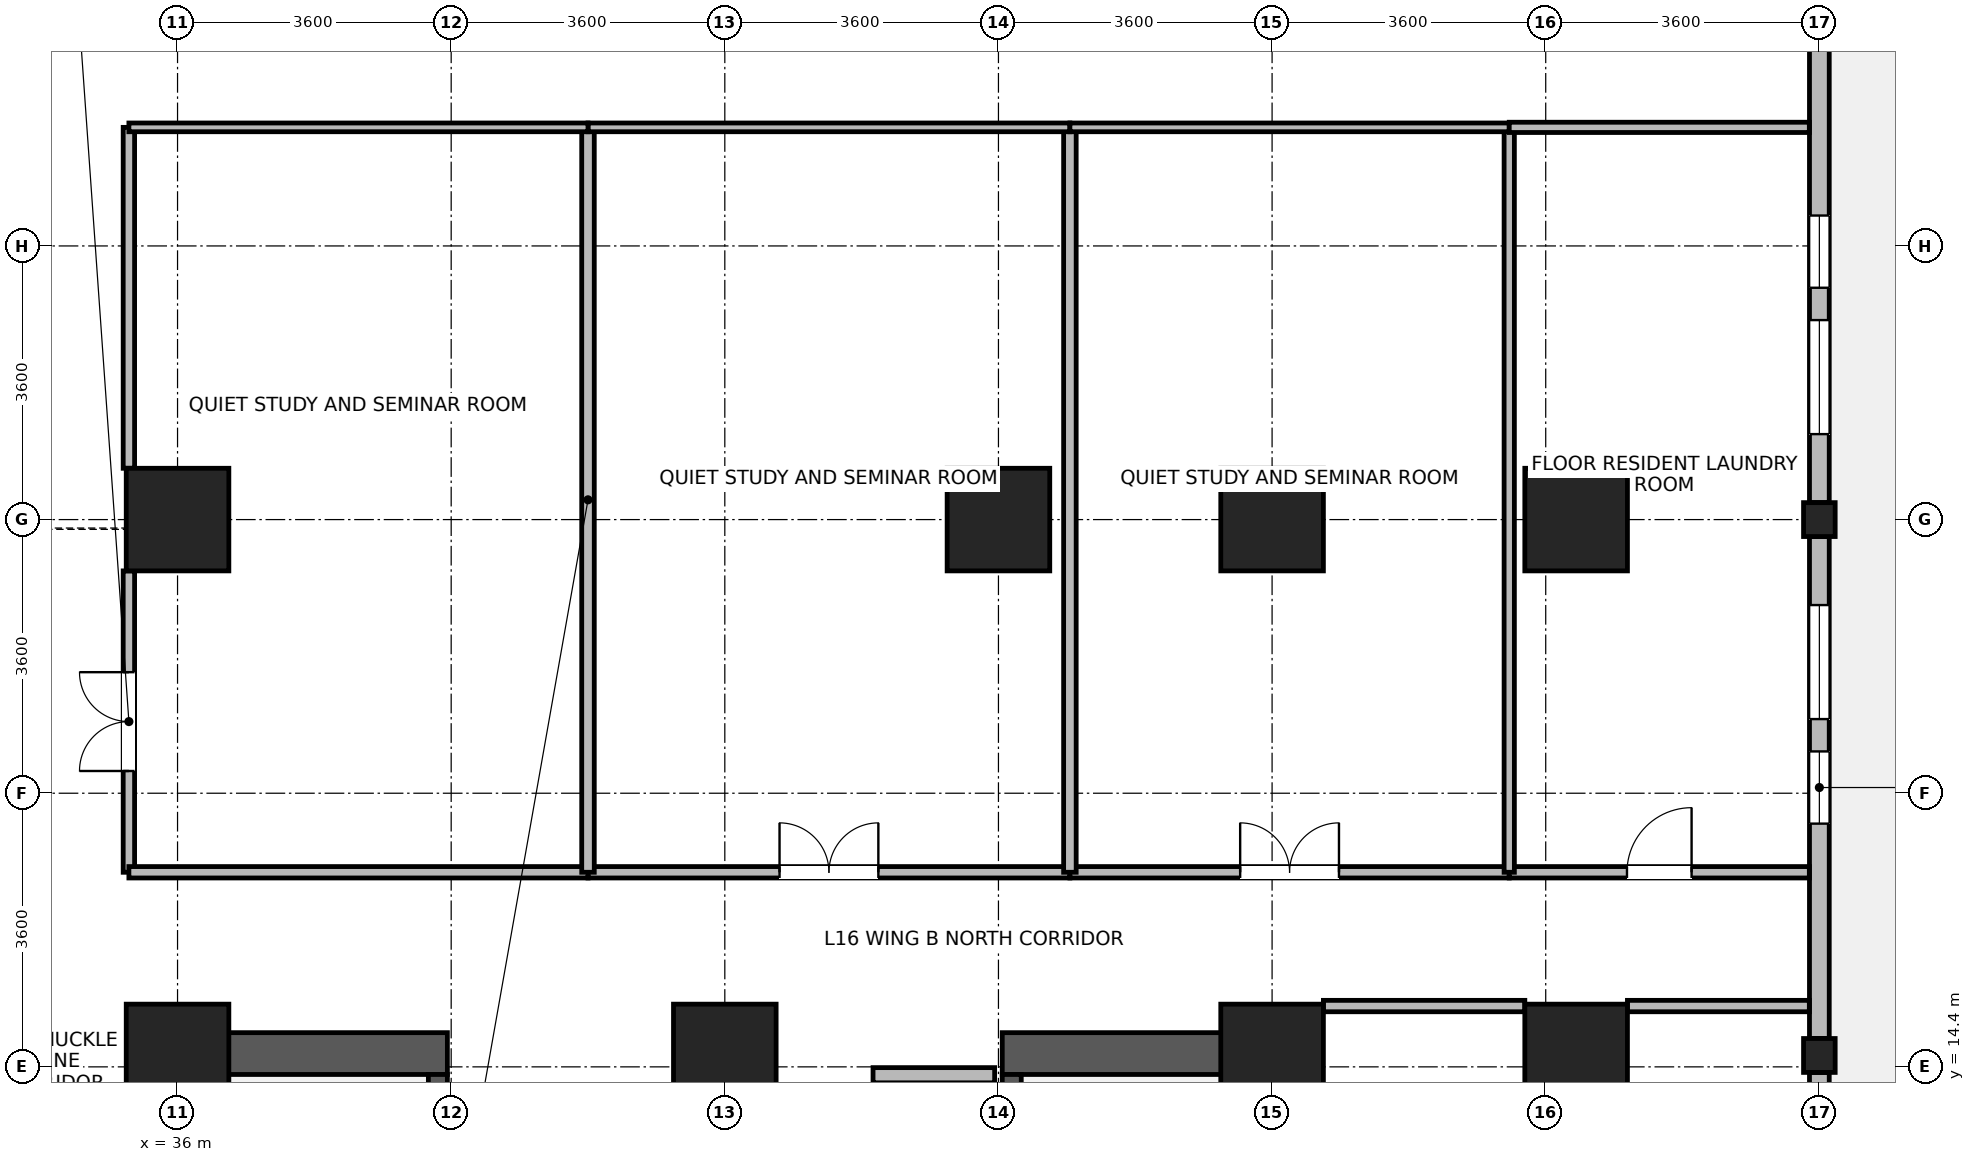
"""IFC4 building model, lengths in metres.
Left out: names, types, materials, properties, quantities, classifications, styles, units other than length and angle.
Written with IfcOpenShell. Run it as: python <this file> out.ifc"""

import sys

from ifc_helpers import new_model, si_unit, direction, frame, frame_2d, origin, origin_2d, place, context, subcontext, project, spatial, rectangle, i_section, extrude, source, transform, mapped, element, fill, save


model = new_model("IFC4")
c1 = context("Model", 3, precision=1e-05, world=origin(), true_north=direction((0.0, 1.0)))
c2 = subcontext(c1, "Body", "Model", "MODEL_VIEW")
j1 = project(units=[si_unit("LENGTHUNIT", "METRE"), si_unit("PLANEANGLEUNIT", "RADIAN")], contexts=[c1])
p1 = place(None, origin())
s1 = spatial("IfcSite", under=j1, at=p1, CompositionType="ELEMENT")
p2 = place(p1, origin())
s2 = spatial("IfcBuilding", under=s1, at=p2, CompositionType="ELEMENT")
p3 = place(p2, frame((0.0, 0.0, 66.0)))
s3 = spatial("IfcBuildingStorey", under=s2, at=p3, CompositionType="ELEMENT", Elevation=66.0)
for number, where, z_axis, x_axis in (
    (1, (36.075, 6.75, 0.0), (0.0, 0.0, 1.0), (0.0, 1.0, 0.0)),
    (2, (50.325, 6.75, 0.0), (0.0, 0.0, 1.0), (0.0, 1.0, 0.0)),
):
    element("IfcWall", number, at=place(p3, frame(where, z_axis=z_axis, x_axis=x_axis)), inside=s3, PredefinedType="SHEAR", context=c2, shape_type="SweptSolid", body=[
        extrude(rectangle(XDim=8.1, YDim=0.55, at=frame_2d((4.05, 0.0))), origin(), (0.0, 0.0, 1.0), 3.45),
    ])
for number, where, z_axis, x_axis in (
    (3, (36.35, 14.575, 0.0), (0.0, 0.0, 1.0), (1.0, 0.0, 0.0)),
    (4, (46.85, 14.575, 0.0), (0.0, 0.0, 1.0), (1.0, 0.0, 0.0)),
):
    element("IfcWall", number, at=place(p3, frame(where, z_axis=z_axis, x_axis=x_axis)), inside=s3, PredefinedType="SHEAR", context=c2, shape_type="SweptSolid", body=[
        extrude(rectangle(XDim=3.2, YDim=0.55, at=frame_2d((1.6, 0.0))), origin(), (0.0, 0.0, 1.0), 3.45),
    ])
p4 = place(p3, frame((39.425, 7.3, 0.0), z_axis=(0.0, 0.0, 1.0), x_axis=(0.0, 1.0, 0.0)))
e5 = element("IfcWall", 5, at=p4, inside=s3, PredefinedType="SHEAR", context=c2, shape_type="SweptSolid", body=[
    extrude(rectangle(XDim=7.0, YDim=0.25, at=frame_2d((3.5, 0.0))), origin(), (0.0, 0.0, 1.0), 3.45),
])
p5 = place(p4, frame((0.15, 0.0, 0.0)))
e6 = element("IfcOpeningElement", 6, at=p5, cuts=e5, PredefinedType="OPENING", context=c2, shape_type="SweptSolid", body=[
    extrude(rectangle(XDim=1.1, YDim=2.08, at=frame_2d((0.55, 1.04))), frame((0.0, 0.135, 0.0), z_axis=(0.0, -1.0, 0.0), x_axis=(1.0, 0.0, 0.0)), (0.0, 0.0, 1.0), 0.27),
])
p6 = place(p3, frame((46.975, 7.3, 0.0), z_axis=(0.0, 0.0, 1.0), x_axis=(0.0, 1.0, 0.0)))
e7 = element("IfcWall", 7, at=p6, inside=s3, PredefinedType="SHEAR", context=c2, shape_type="SweptSolid", body=[
    extrude(rectangle(XDim=7.0, YDim=0.25, at=frame_2d((3.5, 0.0))), origin(), (0.0, 0.0, 1.0), 3.45),
])
p7 = place(p6, frame((0.15, 0.0, 0.0)))
e8 = element("IfcOpeningElement", 8, at=p7, cuts=e7, PredefinedType="OPENING", context=c2, shape_type="SweptSolid", body=[
    extrude(rectangle(XDim=1.1, YDim=2.08, at=frame_2d((0.55, 1.04))), frame((0.0, 0.135, 0.0), z_axis=(0.0, -1.0, 0.0), x_axis=(1.0, 0.0, 0.0)), (0.0, 0.0, 1.0), 0.27),
])
m1 = source(origin(), c2, "Body", "SweptSolid", [
    extrude(rectangle(XDim=1.35, YDim=1.35, at=origin_2d()), origin(), (0.0, 0.0, 1.0), 3.7),
])
for number, where, z_axis, x_axis in (
    (9, (36.0, 21.6, 0.0), (0.0, 0.0, 1.0), (1.0, 0.0, 0.0)),
    (10, (46.8, 21.6, 0.0), (0.0, 0.0, 1.0), (1.0, 0.0, 0.0)),
    (11, (36.0, 14.55, 0.0), (0.0, 0.0, 1.0), (1.0, 0.0, 0.0)),
    (12, (43.2, 14.55, 0.0), (0.0, 0.0, 1.0), (1.0, 0.0, 0.0)),
    (13, (50.4, 14.55, 0.0), (0.0, 0.0, 1.0), (1.0, 0.0, 0.0)),
    (14, (50.4, 21.6, 0.0), (0.0, 0.0, 1.0), (1.0, 0.0, 0.0)),
    (15, (54.4, 14.55, 0.0), (0.0, 0.0, 1.0), (1.0, 0.0, 0.0)),
    (16, (54.4, 21.6, 0.0), (0.0, 0.0, 1.0), (1.0, 0.0, 0.0)),
):
    element("IfcColumn", number, at=place(p3, frame(where, z_axis=z_axis, x_axis=x_axis)), inside=s3, PredefinedType="COLUMN", context=c2, shape_type="MappedRepresentation", body=[
        mapped(m1, transform((0.0, 0.0, 0.0), x_axis=(1.0, 0.0, 0.0), y_axis=(0.0, 1.0, 0.0), z_axis=(0.0, 0.0, 1.0), scale=1.0)),
    ])
m2 = source(origin(), c2, "Body", "SweptSolid", [
    extrude(i_section(OverallWidth=0.416, OverallDepth=0.446, WebThickness=0.029, FlangeThickness=0.04, FilletRadius=0.015, at=origin_2d()), origin(), (0.0, 0.0, 1.0), 3.7),
])
for number, where, z_axis, x_axis in (
    (17, (57.6, 14.55, 0.0), (0.0, 0.0, 1.0), (1.0, 0.0, 0.0)),
    (18, (57.6, 21.6, 0.0), (0.0, 0.0, 1.0), (1.0, 0.0, 0.0)),
):
    element("IfcColumn", number, at=place(p3, frame(where, z_axis=z_axis, x_axis=x_axis)), inside=s3, PredefinedType="COLUMN", context=c2, shape_type="MappedRepresentation", body=[
        mapped(m2, transform((0.0, 0.0, 0.0), x_axis=(1.0, 0.0, 0.0), y_axis=(0.0, 1.0, 0.0), z_axis=(0.0, 0.0, 1.0), scale=1.0)),
    ])
p8 = place(p3, frame((57.6, 14.326, 0.0), z_axis=(0.0, 0.0, 1.0), x_axis=(0.0, -1.0, 0.0)))
e19 = element("IfcWall", 19, at=p8, inside=s3, PredefinedType="STANDARD", context=c2, shape_type="SweptSolid", body=[
    extrude(rectangle(XDim=7.052, YDim=0.26, at=frame_2d((3.526, 0.0))), origin(), (0.0, 0.0, 1.0), 2.93),
])
p9 = place(p8, frame((2.776, 0.0, 0.0)))
e20 = element("IfcOpeningElement", 20, at=p9, cuts=e19, PredefinedType="OPENING", context=c2, shape_type="SweptSolid", body=[
    extrude(rectangle(XDim=1.5, YDim=2.15, at=frame_2d((0.75, 1.075))), frame((0.0, 0.14, 0.0), z_axis=(0.0, -1.0, 0.0), x_axis=(1.0, 0.0, 0.0)), (0.0, 0.0, 1.0), 0.28),
])
p10 = place(p8, frame((1.013, 0.0, 0.85)))
e21 = element("IfcOpeningElement", 21, at=p10, cuts=e19, PredefinedType="OPENING", context=c2, shape_type="SweptSolid", body=[
    extrude(rectangle(XDim=1.5, YDim=1.85, at=frame_2d((0.75, 0.925))), frame((0.0, 0.14, 0.0), z_axis=(0.0, -1.0, 0.0), x_axis=(1.0, 0.0, 0.0)), (0.0, 0.0, 1.0), 0.28),
])
p11 = place(p8, frame((4.539, 0.0, 0.85)))
e22 = element("IfcOpeningElement", 22, at=p11, cuts=e19, PredefinedType="OPENING", context=c2, shape_type="SweptSolid", body=[
    extrude(rectangle(XDim=1.5, YDim=1.85, at=frame_2d((0.75, 0.925))), frame((0.0, 0.14, 0.0), z_axis=(0.0, -1.0, 0.0), x_axis=(1.0, 0.0, 0.0)), (0.0, 0.0, 1.0), 0.28),
])
p12 = place(p3, frame((57.6, 21.376, 0.0), z_axis=(0.0, 0.0, 1.0), x_axis=(0.0, -1.0, 0.0)))
e23 = element("IfcWall", 23, at=p12, inside=s3, PredefinedType="STANDARD", context=c2, shape_type="SweptSolid", body=[
    extrude(rectangle(XDim=6.602, YDim=0.26, at=frame_2d((3.301, 0.0))), origin(), (0.0, 0.0, 1.0), 2.93),
])
p13 = place(p12, frame((0.9, 0.0, 0.85)))
e24 = element("IfcOpeningElement", 24, at=p13, cuts=e23, PredefinedType="OPENING", context=c2, shape_type="SweptSolid", body=[
    extrude(rectangle(XDim=1.5, YDim=1.85, at=frame_2d((0.75, 0.925))), frame((0.0, 0.14, 0.0), z_axis=(0.0, -1.0, 0.0), x_axis=(1.0, 0.0, 0.0)), (0.0, 0.0, 1.0), 0.28),
])
p14 = place(p12, frame((2.826, 0.0, 0.85)))
e25 = element("IfcOpeningElement", 25, at=p14, cuts=e23, PredefinedType="OPENING", context=c2, shape_type="SweptSolid", body=[
    extrude(rectangle(XDim=0.95, YDim=1.75, at=frame_2d((0.475, 0.875))), frame((0.0, 0.14, 0.0), z_axis=(0.0, -1.0, 0.0), x_axis=(1.0, 0.0, 0.0)), (0.0, 0.0, 1.0), 0.28),
])
p15 = place(p3, frame((57.6, 28.426, 0.0), z_axis=(0.0, 0.0, 1.0), x_axis=(0.0, -1.0, 0.0)))
e26 = element("IfcWall", 26, at=p15, inside=s3, PredefinedType="STANDARD", context=c2, shape_type="SweptSolid", body=[
    extrude(rectangle(XDim=6.602, YDim=0.26, at=frame_2d((3.301, 0.0))), origin(), (0.0, 0.0, 1.0), 2.93),
])
p16 = place(p15, frame((4.201, 0.0, 0.85)))
e27 = element("IfcOpeningElement", 27, at=p16, cuts=e26, PredefinedType="OPENING", context=c2, shape_type="SweptSolid", body=[
    extrude(rectangle(XDim=1.5, YDim=1.85, at=frame_2d((0.75, 0.925))), frame((0.0, 0.14, 0.0), z_axis=(0.0, -1.0, 0.0), x_axis=(1.0, 0.0, 0.0)), (0.0, 0.0, 1.0), 0.28),
])
p17 = place(p15, frame((2.826, 0.0, 0.85)))
e28 = element("IfcOpeningElement", 28, at=p17, cuts=e26, PredefinedType="OPENING", context=c2, shape_type="SweptSolid", body=[
    extrude(rectangle(XDim=0.95, YDim=1.75, at=frame_2d((0.475, 0.875))), frame((0.0, 0.14, 0.0), z_axis=(0.0, -1.0, 0.0), x_axis=(1.0, 0.0, 0.0)), (0.0, 0.0, 1.0), 0.28),
])
p18 = place(p3, frame((45.15, 14.29, 0.0), z_axis=(0.0, 0.0, 1.0), x_axis=(1.0, 0.0, 0.0)))
e29 = element("IfcWall", 29, at=p18, inside=s3, PredefinedType="PARTITIONING", context=c2, shape_type="SweptSolid", body=[
    extrude(rectangle(XDim=1.6, YDim=0.2, at=frame_2d((0.8, 0.0))), origin(), (0.0, 0.0, 1.0), 2.23),
])
p19 = place(p3, frame((35.36, 16.96, 0.0), z_axis=(0.0, 0.0, 1.0), x_axis=(0.0, 1.0, 0.0)))
e30 = element("IfcWall", 30, at=p19, inside=s3, PredefinedType="PARTITIONING", context=c2, shape_type="SweptSolid", body=[
    extrude(rectangle(XDim=3.965, YDim=0.15, at=frame_2d((1.982, 0.0))), origin(), (0.0, 0.0, 1.0), 3.43),
])
p20 = place(p19, frame((1.333, 0.0, 0.0)))
e31 = element("IfcOpeningElement", 31, at=p20, cuts=e30, PredefinedType="OPENING", context=c2, shape_type="SweptSolid", body=[
    extrude(rectangle(XDim=1.3, YDim=2.12, at=frame_2d((0.65, 1.06))), frame((0.0, 0.085, 0.0), z_axis=(0.0, -1.0, 0.0), x_axis=(1.0, 0.0, 0.0)), (0.0, 0.0, 1.0), 0.17),
])
p21 = place(p3, frame((35.36, 22.275, 0.0), z_axis=(0.0, 0.0, 1.0), x_axis=(0.0, 1.0, 0.0)))
e32 = element("IfcWall", 32, at=p21, inside=s3, PredefinedType="PARTITIONING", context=c2, shape_type="SweptSolid", body=[
    extrude(rectangle(XDim=4.485, YDim=0.15, at=frame_2d((2.243, 0.0))), origin(), (0.0, 0.0, 1.0), 3.43),
])
p22 = place(p3, frame((51.075, 15.2, 0.0), z_axis=(0.0, 0.0, 1.0), x_axis=(1.0, 0.0, 0.0)))
e33 = element("IfcWall", 33, at=p22, inside=s3, PredefinedType="PARTITIONING", context=c2, shape_type="SweptSolid", body=[
    extrude(rectangle(XDim=2.65, YDim=0.15, at=frame_2d((1.325, 0.0))), origin(), (0.0, 0.0, 1.0), 3.43),
])
p23 = place(p3, frame((55.075, 15.2, 0.0), z_axis=(0.0, 0.0, 1.0), x_axis=(1.0, 0.0, 0.0)))
e34 = element("IfcWall", 34, at=p23, inside=s3, PredefinedType="PARTITIONING", context=c2, shape_type="SweptSolid", body=[
    extrude(rectangle(XDim=2.393, YDim=0.15, at=frame_2d((1.197, 0.0))), origin(), (0.0, 0.0, 1.0), 3.43),
])
p24 = place(p3, frame((41.4, 16.96, 0.0), z_axis=(0.0, 0.0, 1.0), x_axis=(1.0, 0.0, 0.0)))
e35 = element("IfcWall", 35, at=p24, inside=s3, PredefinedType="PARTITIONING", context=c2, shape_type="SweptSolid", body=[
    extrude(rectangle(XDim=6.34, YDim=0.15, at=frame_2d((3.17, 0.0))), origin(), (0.0, 0.0, 1.0), 3.43),
])
p25 = place(p24, frame((2.52, 0.0, 0.0)))
e36 = element("IfcOpeningElement", 36, at=p25, cuts=e35, PredefinedType="OPENING", context=c2, shape_type="SweptSolid", body=[
    extrude(rectangle(XDim=1.3, YDim=2.12, at=frame_2d((0.65, 1.06))), frame((0.0, 0.085, 0.0), z_axis=(0.0, -1.0, 0.0), x_axis=(1.0, 0.0, 0.0)), (0.0, 0.0, 1.0), 0.17),
])
p26 = place(p3, frame((35.36, 16.96, 0.0), z_axis=(0.0, 0.0, 1.0), x_axis=(1.0, 0.0, 0.0)))
e37 = element("IfcWall", 37, at=p26, inside=s3, PredefinedType="PARTITIONING", context=c2, shape_type="SweptSolid", body=[
    extrude(rectangle(XDim=6.04, YDim=0.15, at=frame_2d((3.02, 0.0))), origin(), (0.0, 0.0, 1.0), 3.43),
])
p27 = place(p3, frame((47.74, 16.96, 0.0), z_axis=(0.0, 0.0, 1.0), x_axis=(1.0, 0.0, 0.0)))
e38 = element("IfcWall", 38, at=p27, inside=s3, PredefinedType="PARTITIONING", context=c2, shape_type="SweptSolid", body=[
    extrude(rectangle(XDim=5.78, YDim=0.15, at=frame_2d((2.89, 0.0))), origin(), (0.0, 0.0, 1.0), 3.43),
])
p28 = place(p27, frame((2.24, 0.0, 0.0)))
e39 = element("IfcOpeningElement", 39, at=p28, cuts=e38, PredefinedType="OPENING", context=c2, shape_type="SweptSolid", body=[
    extrude(rectangle(XDim=1.3, YDim=2.12, at=frame_2d((0.65, 1.06))), frame((0.0, 0.085, 0.0), z_axis=(0.0, -1.0, 0.0), x_axis=(1.0, 0.0, 0.0)), (0.0, 0.0, 1.0), 0.17),
])
p29 = place(p3, frame((53.52, 16.96, 0.0), z_axis=(0.0, 0.0, 1.0), x_axis=(1.0, 0.0, 0.0)))
e40 = element("IfcWall", 40, at=p29, inside=s3, PredefinedType="PARTITIONING", context=c2, shape_type="SweptSolid", body=[
    extrude(rectangle(XDim=3.948, YDim=0.15, at=frame_2d((1.974, 0.0))), origin(), (0.0, 0.0, 1.0), 3.43),
])
p30 = place(p29, frame((1.549, 0.0, 0.0)))
e41 = element("IfcOpeningElement", 41, at=p30, cuts=e40, PredefinedType="OPENING", context=c2, shape_type="SweptSolid", body=[
    extrude(rectangle(XDim=0.85, YDim=2.04, at=frame_2d((0.425, 1.02))), frame((0.0, 0.085, 0.0), z_axis=(0.0, -1.0, 0.0), x_axis=(1.0, 0.0, 0.0)), (0.0, 0.0, 1.0), 0.17),
])
for number, where, z_axis, x_axis in (
    (42, (41.4, 16.96, 0.0), (0.0, 0.0, 1.0), (0.0, 1.0, 0.0)),
    (43, (47.74, 16.96, 0.0), (0.0, 0.0, 1.0), (0.0, 1.0, 0.0)),
):
    element("IfcWall", number, at=place(p3, frame(where, z_axis=z_axis, x_axis=x_axis)), inside=s3, PredefinedType="PARTITIONING", context=c2, shape_type="SweptSolid", body=[
        extrude(rectangle(XDim=9.8, YDim=0.165, at=frame_2d((4.9, 0.0))), origin(), (0.0, 0.0, 1.0), 3.43),
    ])
p31 = place(p3, frame((53.52, 16.96, 0.0), z_axis=(0.0, 0.0, 1.0), x_axis=(0.0, 1.0, 0.0)))
e44 = element("IfcWall", 44, at=p31, inside=s3, PredefinedType="PARTITIONING", context=c2, shape_type="SweptSolid", body=[
    extrude(rectangle(XDim=9.8, YDim=0.135, at=frame_2d((4.9, 0.0))), origin(), (0.0, 0.0, 1.0), 3.43),
])
p32 = place(p3, frame((41.4, 26.76, 0.0), z_axis=(0.0, 0.0, 1.0), x_axis=(1.0, 0.0, 0.0)))
e45 = element("IfcWall", 45, at=p32, inside=s3, PredefinedType="PARTITIONING", context=c2, shape_type="SweptSolid", body=[
    extrude(rectangle(XDim=6.34, YDim=0.115, at=frame_2d((3.17, 0.0))), origin(), (0.0, 0.0, 1.0), 3.43),
])
p33 = place(p3, frame((35.36, 26.76, 0.0), z_axis=(0.0, 0.0, 1.0), x_axis=(1.0, 0.0, 0.0)))
e46 = element("IfcWall", 46, at=p33, inside=s3, PredefinedType="PARTITIONING", context=c2, shape_type="SweptSolid", body=[
    extrude(rectangle(XDim=6.04, YDim=0.115, at=frame_2d((3.02, 0.0))), origin(), (0.0, 0.0, 1.0), 3.43),
])
p34 = place(p3, frame((47.74, 26.76, 0.0), z_axis=(0.0, 0.0, 1.0), x_axis=(1.0, 0.0, 0.0)))
e47 = element("IfcWall", 47, at=p34, inside=s3, PredefinedType="PARTITIONING", context=c2, shape_type="SweptSolid", body=[
    extrude(rectangle(XDim=5.78, YDim=0.115, at=frame_2d((2.89, 0.0))), origin(), (0.0, 0.0, 1.0), 3.43),
])
p35 = place(p3, frame((53.52, 26.76, 0.0), z_axis=(0.0, 0.0, 1.0), x_axis=(1.0, 0.0, 0.0)))
e48 = element("IfcWall", 48, at=p35, inside=s3, PredefinedType="PARTITIONING", context=c2, shape_type="SweptSolid", body=[
    extrude(rectangle(XDim=3.948, YDim=0.135, at=frame_2d((1.974, 0.0))), origin(), (0.0, 0.0, 1.0), 3.43),
])
p36 = place(p13, origin())
e49 = element("IfcWindow", 49, at=p36, inside=s3, PartitioningType="SINGLE_PANEL", PredefinedType="WINDOW", context=c2, shape_type="SweptSolid", body=[
    extrude(rectangle(XDim=1.5, YDim=1.85, at=frame_2d((0.75, 0.925))), frame((0.0, 0.03, 0.0), z_axis=(0.0, -1.0, 0.0), x_axis=(1.0, 0.0, 0.0)), (0.0, 0.0, 1.0), 0.06),
])
fill(e24, e49)
p37 = place(p14, origin())
e50 = element("IfcWindow", 50, at=p37, inside=s3, PartitioningType="SINGLE_PANEL", PredefinedType="WINDOW", context=c2, shape_type="SweptSolid", body=[
    extrude(rectangle(XDim=0.95, YDim=1.75, at=frame_2d((0.475, 0.875))), frame((0.0, 0.03, 0.0), z_axis=(0.0, -1.0, 0.0), x_axis=(1.0, 0.0, 0.0)), (0.0, 0.0, 1.0), 0.06),
])
fill(e25, e50)
p38 = place(p16, origin())
e51 = element("IfcWindow", 51, at=p38, inside=s3, PartitioningType="SINGLE_PANEL", PredefinedType="WINDOW", context=c2, shape_type="SweptSolid", body=[
    extrude(rectangle(XDim=1.5, YDim=1.85, at=frame_2d((0.75, 0.925))), frame((0.0, 0.03, 0.0), z_axis=(0.0, -1.0, 0.0), x_axis=(1.0, 0.0, 0.0)), (0.0, 0.0, 1.0), 0.06),
])
fill(e27, e51)
p39 = place(p17, origin())
e52 = element("IfcWindow", 52, at=p39, inside=s3, PartitioningType="SINGLE_PANEL", PredefinedType="WINDOW", context=c2, shape_type="SweptSolid", body=[
    extrude(rectangle(XDim=0.95, YDim=1.75, at=frame_2d((0.475, 0.875))), frame((0.0, 0.03, 0.0), z_axis=(0.0, -1.0, 0.0), x_axis=(1.0, 0.0, 0.0)), (0.0, 0.0, 1.0), 0.06),
])
fill(e28, e52)
p40 = place(p20, origin())
e53 = element("IfcDoor", 53, at=p40, inside=s3, OperationType="DOUBLE_DOOR_SINGLE_SWING", PredefinedType="DOOR", context=c2, shape_type="SweptSolid", body=[
    extrude(rectangle(XDim=1.3, YDim=2.12, at=frame_2d((0.65, 1.06))), frame((0.0, 0.025, 0.0), z_axis=(0.0, -1.0, 0.0), x_axis=(1.0, 0.0, 0.0)), (0.0, 0.0, 1.0), 0.05),
])
fill(e31, e53)
p41 = place(p25, origin())
e54 = element("IfcDoor", 54, at=p41, inside=s3, OperationType="DOUBLE_DOOR_SINGLE_SWING", PredefinedType="DOOR", context=c2, shape_type="SweptSolid", body=[
    extrude(rectangle(XDim=1.3, YDim=2.12, at=frame_2d((0.65, 1.06))), frame((0.0, 0.025, 0.0), z_axis=(0.0, -1.0, 0.0), x_axis=(1.0, 0.0, 0.0)), (0.0, 0.0, 1.0), 0.05),
])
fill(e36, e54)
p42 = place(p28, origin())
e55 = element("IfcDoor", 55, at=p42, inside=s3, OperationType="DOUBLE_DOOR_SINGLE_SWING", PredefinedType="DOOR", context=c2, shape_type="SweptSolid", body=[
    extrude(rectangle(XDim=1.3, YDim=2.12, at=frame_2d((0.65, 1.06))), frame((0.0, 0.025, 0.0), z_axis=(0.0, -1.0, 0.0), x_axis=(1.0, 0.0, 0.0)), (0.0, 0.0, 1.0), 0.05),
])
fill(e39, e55)
p43 = place(p30, origin())
e56 = element("IfcDoor", 56, at=p43, inside=s3, OperationType="SINGLE_SWING_RIGHT", PredefinedType="DOOR", context=c2, shape_type="SweptSolid", body=[
    extrude(rectangle(XDim=0.85, YDim=2.04, at=frame_2d((0.425, 1.02))), frame((0.0, 0.025, 0.0), z_axis=(0.0, -1.0, 0.0), x_axis=(1.0, 0.0, 0.0)), (0.0, 0.0, 1.0), 0.05),
])
fill(e41, e56)
save(model, sys.argv[1])
